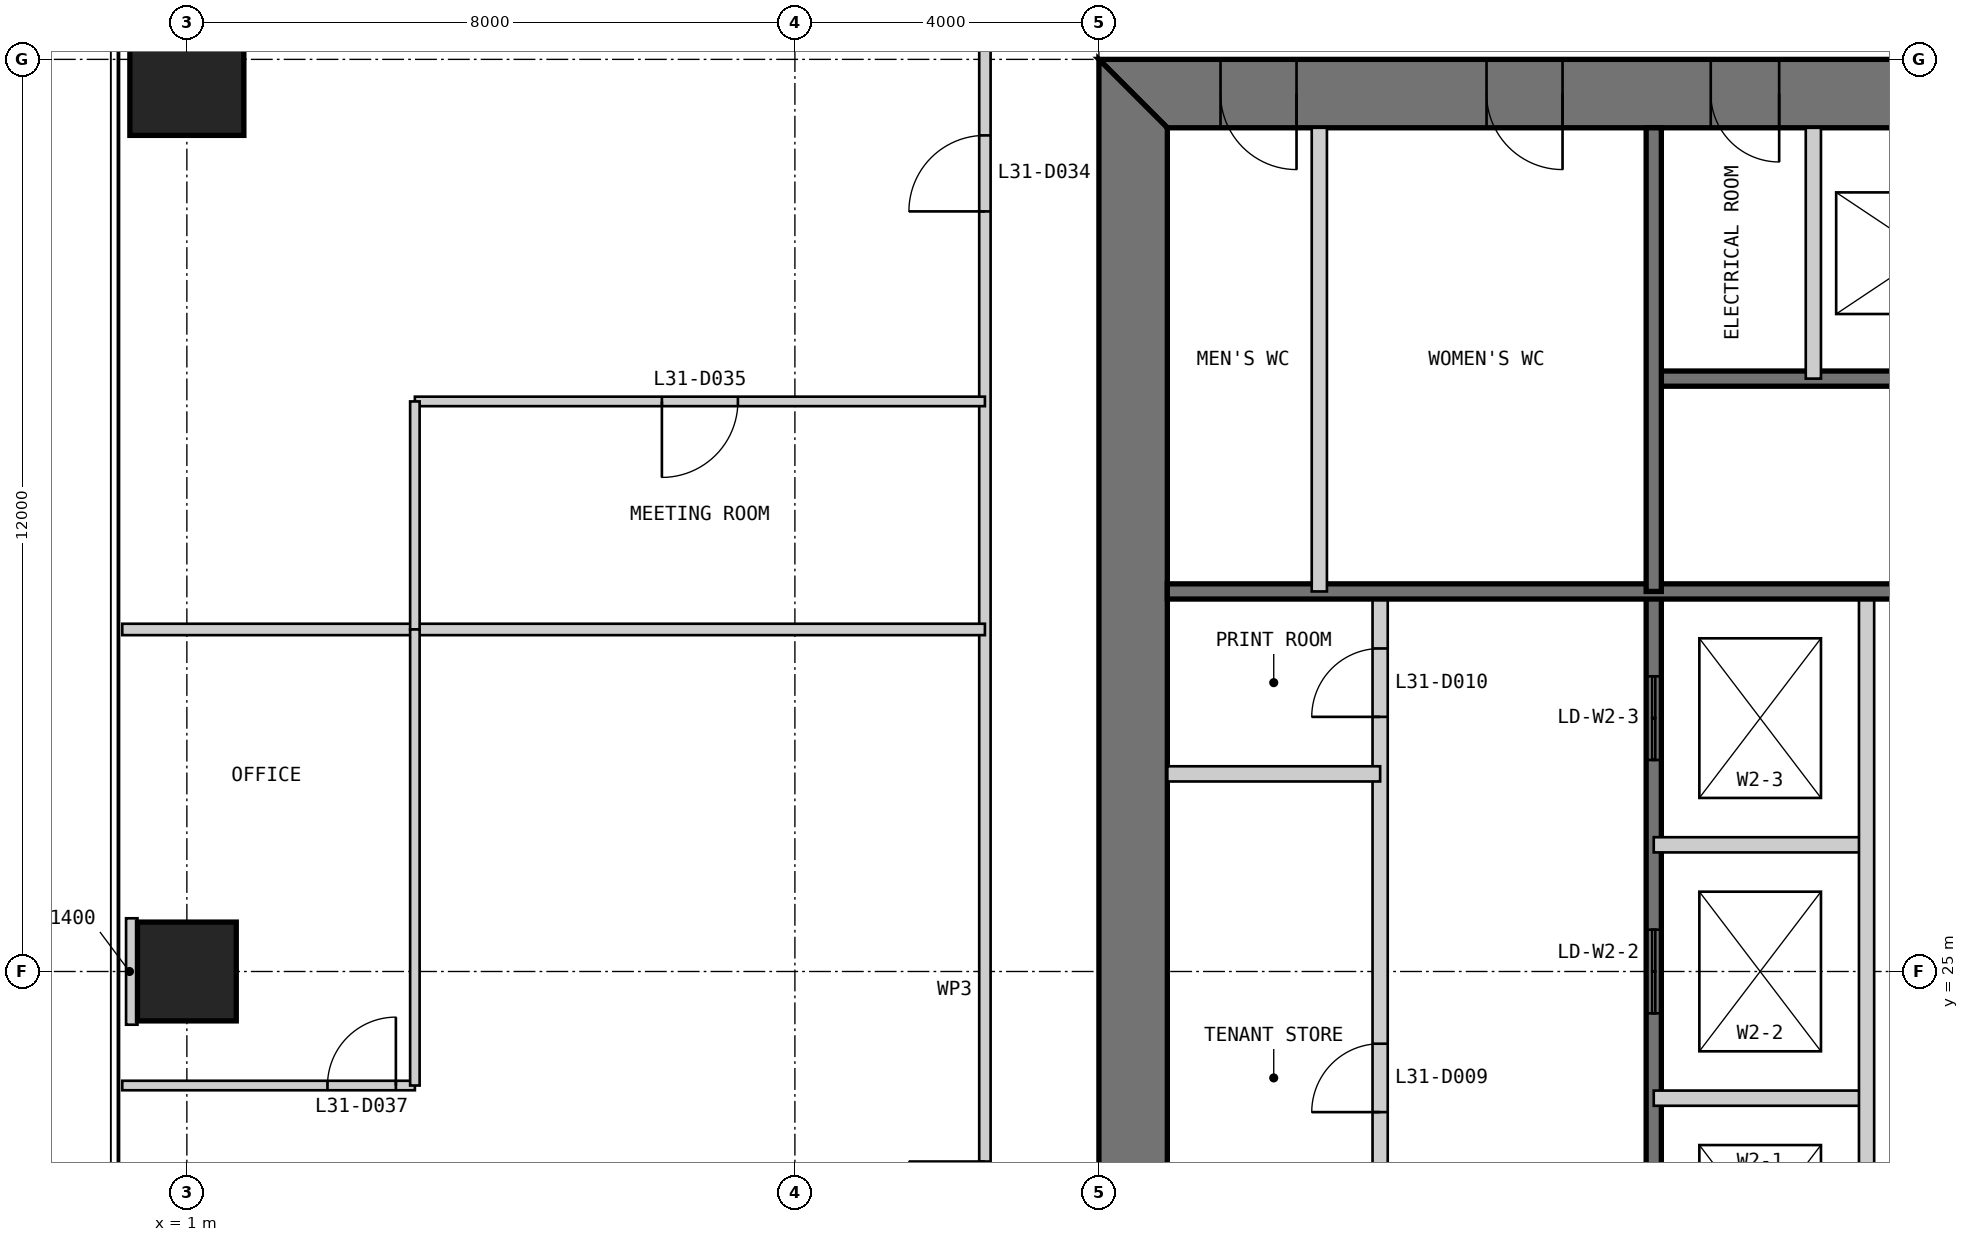
"""IFC4 building model, lengths in metres.
Left out: names, types, materials, properties, quantities, classifications, styles, units other than length and angle.
Written with IfcOpenShell. Run it as: python <this file> out.ifc"""

import sys

from ifc_helpers import new_model, si_unit, direction, frame, frame_2d, origin, origin_2d, place, context, subcontext, project, spatial, polyline, rectangle, outline, extrude, element, fill, save


model = new_model("IFC4")
c1 = context("Model", 3, precision=1e-05, world=origin(), true_north=direction((0.0, 1.0)))
c2 = subcontext(c1, "Body", "Model", "MODEL_VIEW")
j1 = project(units=[si_unit("LENGTHUNIT", "METRE"), si_unit("PLANEANGLEUNIT", "RADIAN")], contexts=[c1])
p1 = place(None, origin())
s1 = spatial("IfcSite", under=j1, at=p1, CompositionType="ELEMENT")
p2 = place(p1, origin())
s2 = spatial("IfcBuilding", under=s1, at=p2, CompositionType="ELEMENT")
p3 = place(p2, frame((0.0, 0.0, 134.4)))
s3 = spatial("IfcBuildingStorey", under=s2, at=p3, CompositionType="ELEMENT", Elevation=134.4)
p4 = place(p3, frame((1.0, 37.0, 0.0), z_axis=(0.0, 0.0, 1.0), x_axis=(1.0, 0.0, 0.0)))
e1 = element("IfcColumn", 1, at=p4, inside=s3, PredefinedType="COLUMN", context=c2, shape_type="SweptSolid", body=[
    extrude(rectangle(XDim=1.5, YDim=2.0, at=origin_2d()), origin(), (0.0, 0.0, 1.0), 4.0),
])
p5 = place(p3, frame((1.0, 25.0, 0.0), z_axis=(0.0, 0.0, 1.0), x_axis=(1.0, 0.0, 0.0)))
e2 = element("IfcColumn", 2, at=p5, inside=s3, PredefinedType="COLUMN", context=c2, shape_type="SweptSolid", body=[
    extrude(rectangle(XDim=1.3, YDim=1.3, at=origin_2d()), origin(), (0.0, 0.0, 1.0), 4.0),
])
p6 = place(p3, frame((37.0, 36.55, 0.0), z_axis=(0.0, 0.0, 1.0), x_axis=(-1.0, 0.0, 0.0)))
e3 = element("IfcWall", 3, at=p6, inside=s3, PredefinedType="SHEAR", context=c2, shape_type="SweptSolid", body=[
    extrude(outline(polyline([(0.0, -0.45), (24.0, -0.45), (23.1, 0.45), (0.9, 0.45), (0.0, -0.45)])), origin(), (0.0, 0.0, 1.0), 4.0),
])
p7 = place(p6, frame((4.9, 0.0, 0.0)))
e4 = element("IfcOpeningElement", 4, at=p7, cuts=e3, PredefinedType="OPENING", context=c2, shape_type="SweptSolid", body=[
    extrude(rectangle(XDim=1.0, YDim=2.2, at=frame_2d((0.5, 1.1))), frame((0.0, 0.46, 0.0), z_axis=(0.0, -1.0, 0.0), x_axis=(1.0, 0.0, 0.0)), (0.0, 0.0, 1.0), 0.92),
])
p8 = place(p6, frame((8.9, 0.0, 0.0)))
e5 = element("IfcOpeningElement", 5, at=p8, cuts=e3, PredefinedType="OPENING", context=c2, shape_type="SweptSolid", body=[
    extrude(rectangle(XDim=1.1, YDim=2.2, at=frame_2d((0.55, 1.1))), frame((0.0, 0.46, 0.0), z_axis=(0.0, -1.0, 0.0), x_axis=(1.0, 0.0, 0.0)), (0.0, 0.0, 1.0), 0.92),
])
p9 = place(p6, frame((15.05, 0.0, 0.0)))
e6 = element("IfcOpeningElement", 6, at=p9, cuts=e3, PredefinedType="OPENING", context=c2, shape_type="SweptSolid", body=[
    extrude(rectangle(XDim=0.9, YDim=2.2, at=frame_2d((0.45, 1.1))), frame((0.0, 0.46, 0.0), z_axis=(0.0, -1.0, 0.0), x_axis=(1.0, 0.0, 0.0)), (0.0, 0.0, 1.0), 0.92),
])
p10 = place(p6, frame((17.9, 0.0, 0.0)))
e7 = element("IfcOpeningElement", 7, at=p10, cuts=e3, PredefinedType="OPENING", context=c2, shape_type="SweptSolid", body=[
    extrude(rectangle(XDim=1.0, YDim=2.2, at=frame_2d((0.5, 1.1))), frame((0.0, 0.46, 0.0), z_axis=(0.0, -1.0, 0.0), x_axis=(1.0, 0.0, 0.0)), (0.0, 0.0, 1.0), 0.92),
])
p11 = place(p6, frame((21.4, 0.0, 0.0)))
e8 = element("IfcOpeningElement", 8, at=p11, cuts=e3, PredefinedType="OPENING", context=c2, shape_type="SweptSolid", body=[
    extrude(rectangle(XDim=1.0, YDim=2.2, at=frame_2d((0.5, 1.1))), frame((0.0, 0.46, 0.0), z_axis=(0.0, -1.0, 0.0), x_axis=(1.0, 0.0, 0.0)), (0.0, 0.0, 1.0), 0.92),
])
p12 = place(p3, frame((13.45, 36.1, 0.0), z_axis=(0.0, 0.0, 1.0), x_axis=(0.0, -1.0, 0.0)))
e9 = element("IfcWall", 9, at=p12, inside=s3, PredefinedType="SHEAR", context=c2, shape_type="SweptSolid", body=[
    extrude(outline(polyline([(-0.9, -0.45), (23.1, -0.45), (22.2, 0.45), (0.0, 0.45), (-0.9, -0.45)])), origin(), (0.0, 0.0, 1.0), 4.0),
])
p13 = place(p12, frame((20.2, 0.0, 0.0)))
e10 = element("IfcOpeningElement", 10, at=p13, cuts=e9, PredefinedType="OPENING", context=c2, shape_type="SweptSolid", body=[
    extrude(rectangle(XDim=1.0, YDim=2.2, at=frame_2d((0.5, 1.1))), frame((0.0, 0.46, 0.0), z_axis=(0.0, -1.0, 0.0), x_axis=(1.0, 0.0, 0.0)), (0.0, 0.0, 1.0), 0.92),
])
p14 = place(p12, frame((17.25, 0.0, 0.0)))
e11 = element("IfcOpeningElement", 11, at=p14, cuts=e9, PredefinedType="OPENING", context=c2, shape_type="SweptSolid", body=[
    extrude(rectangle(XDim=0.9, YDim=2.2, at=frame_2d((0.45, 1.1))), frame((0.0, 0.46, 0.0), z_axis=(0.0, -1.0, 0.0), x_axis=(1.0, 0.0, 0.0)), (0.0, 0.0, 1.0), 0.92),
])
p15 = place(p3, frame((16.7, 13.9, 0.0), z_axis=(0.0, 0.0, 1.0), x_axis=(0.0, 1.0, 0.0)))
e12 = element("IfcWall", 12, at=p15, inside=s3, PredefinedType="PARTITIONING", context=c2, shape_type="SweptSolid", body=[
    extrude(rectangle(XDim=16.1, YDim=0.2, at=frame_2d((8.05, 0.0))), origin(), (0.0, 0.0, 1.0), 3.8),
])
p16 = place(p15, frame((9.25, 0.0, 0.0)))
e13 = element("IfcOpeningElement", 13, at=p16, cuts=e12, PredefinedType="OPENING", context=c2, shape_type="SweptSolid", body=[
    extrude(rectangle(XDim=0.9, YDim=2.2, at=frame_2d((0.45, 1.1))), frame((0.0, 0.11, 0.0), z_axis=(0.0, -1.0, 0.0), x_axis=(1.0, 0.0, 0.0)), (0.0, 0.0, 1.0), 0.22),
])
p17 = place(p15, frame((14.45, 0.0, 0.0)))
e14 = element("IfcOpeningElement", 14, at=p17, cuts=e12, PredefinedType="OPENING", context=c2, shape_type="SweptSolid", body=[
    extrude(rectangle(XDim=0.9, YDim=2.2, at=frame_2d((0.45, 1.1))), frame((0.0, 0.11, 0.0), z_axis=(0.0, -1.0, 0.0), x_axis=(1.0, 0.0, 0.0)), (0.0, 0.0, 1.0), 0.22),
])
p18 = place(p3, frame((20.3, 13.9, 0.0), z_axis=(0.0, 0.0, 1.0), x_axis=(0.0, 1.0, 0.0)))
e15 = element("IfcWall", 15, at=p18, inside=s3, PredefinedType="SOLIDWALL", context=c2, shape_type="SweptSolid", body=[
    extrude(rectangle(XDim=16.1, YDim=0.2, at=frame_2d((8.05, 0.0))), origin(), (0.0, 0.0, 1.0), 3.8),
])
p19 = place(p18, frame((7.217, 0.0, 0.0)))
e16 = element("IfcOpeningElement", 16, at=p19, cuts=e15, PredefinedType="OPENING", context=c2, shape_type="SweptSolid", body=[
    extrude(rectangle(XDim=1.1, YDim=2.2, at=frame_2d((0.55, 1.1))), frame((0.0, 0.11, 0.0), z_axis=(0.0, -1.0, 0.0), x_axis=(1.0, 0.0, 0.0)), (0.0, 0.0, 1.0), 0.22),
])
p20 = place(p18, frame((10.55, 0.0, 0.0)))
e17 = element("IfcOpeningElement", 17, at=p20, cuts=e15, PredefinedType="OPENING", context=c2, shape_type="SweptSolid", body=[
    extrude(rectangle(XDim=1.1, YDim=2.2, at=frame_2d((0.55, 1.1))), frame((0.0, 0.11, 0.0), z_axis=(0.0, -1.0, 0.0), x_axis=(1.0, 0.0, 0.0)), (0.0, 0.0, 1.0), 0.22),
])
p21 = place(p18, frame((13.883, 0.0, 0.0)))
e18 = element("IfcOpeningElement", 18, at=p21, cuts=e15, PredefinedType="OPENING", context=c2, shape_type="SweptSolid", body=[
    extrude(rectangle(XDim=1.1, YDim=2.2, at=frame_2d((0.55, 1.1))), frame((0.0, 0.11, 0.0), z_axis=(0.0, -1.0, 0.0), x_axis=(1.0, 0.0, 0.0)), (0.0, 0.0, 1.0), 0.22),
])
for number, where, z_axis, x_axis in (
    (19, (20.3, 23.333, 0.0), (0.0, 0.0, 1.0), (1.0, 0.0, 0.0)),
    (20, (20.3, 26.667, 0.0), (0.0, 0.0, 1.0), (1.0, 0.0, 0.0)),
):
    element("IfcWall", number, at=place(p3, frame(where, z_axis=z_axis, x_axis=x_axis)), inside=s3, PredefinedType="PARTITIONING", context=c2, shape_type="SweptSolid", body=[
        extrude(rectangle(XDim=2.8, YDim=0.2, at=frame_2d((1.4, 0.0))), origin(), (0.0, 0.0, 1.0), 3.8),
    ])
p22 = place(p3, frame((23.1, 20.0, 0.0), z_axis=(0.0, 0.0, 1.0), x_axis=(0.0, 1.0, 0.0)))
e21 = element("IfcWall", 21, at=p22, inside=s3, PredefinedType="PARTITIONING", context=c2, shape_type="SweptSolid", body=[
    extrude(rectangle(XDim=10.0, YDim=0.2, at=frame_2d((5.0, 0.0))), origin(), (0.0, 0.0, 1.0), 3.8),
])
p23 = place(p3, frame((13.9, 27.6, 0.0), z_axis=(0.0, 0.0, 1.0), x_axis=(1.0, 0.0, 0.0)))
e22 = element("IfcWall", 22, at=p23, inside=s3, PredefinedType="PARTITIONING", context=c2, shape_type="SweptSolid", body=[
    extrude(rectangle(XDim=2.8, YDim=0.2, at=frame_2d((1.4, 0.0))), origin(), (0.0, 0.0, 1.0), 3.8),
])
p24 = place(p3, frame((29.7, 32.8, 0.0), z_axis=(0.0, 0.0, 1.0), x_axis=(-1.0, 0.0, 0.0)))
e23 = element("IfcWall", 23, at=p24, inside=s3, PredefinedType="SOLIDWALL", context=c2, shape_type="SweptSolid", body=[
    extrude(rectangle(XDim=9.4, YDim=0.2, at=frame_2d((4.7, 0.0))), origin(), (0.0, 0.0, 1.0), 3.8),
])
p25 = place(p24, frame((0.25, 0.0, 0.0)))
e24 = element("IfcOpeningElement", 24, at=p25, cuts=e23, PredefinedType="OPENING", context=c2, shape_type="SweptSolid", body=[
    extrude(rectangle(XDim=1.0, YDim=2.2, at=frame_2d((0.5, 1.1))), frame((0.0, 0.11, 0.0), z_axis=(0.0, -1.0, 0.0), x_axis=(1.0, 0.0, 0.0)), (0.0, 0.0, 1.0), 0.22),
])
p26 = place(p3, frame((29.7, 30.0, 0.0), z_axis=(0.0, 0.0, 1.0), x_axis=(-1.0, 0.0, 0.0)))
e25 = element("IfcWall", 25, at=p26, inside=s3, PredefinedType="SOLIDWALL", context=c2, shape_type="SweptSolid", body=[
    extrude(rectangle(XDim=15.8, YDim=0.2, at=frame_2d((7.9, 0.0))), origin(), (0.0, 0.0, 1.0), 3.8),
])
p27 = place(p3, frame((22.4, 36.1, 0.0), z_axis=(0.0, 0.0, 1.0), x_axis=(0.0, -1.0, 0.0)))
e26 = element("IfcWall", 26, at=p27, inside=s3, PredefinedType="PARTITIONING", context=c2, shape_type="SweptSolid", body=[
    extrude(rectangle(XDim=3.3, YDim=0.2, at=frame_2d((1.65, 0.0))), origin(), (0.0, 0.0, 1.0), 3.8),
])
p28 = place(p3, frame((20.3, 36.1, 0.0), z_axis=(0.0, 0.0, 1.0), x_axis=(0.0, -1.0, 0.0)))
e27 = element("IfcWall", 27, at=p28, inside=s3, PredefinedType="SOLIDWALL", context=c2, shape_type="SweptSolid", body=[
    extrude(rectangle(XDim=6.1, YDim=0.2, at=frame_2d((3.05, 0.0))), origin(), (0.0, 0.0, 1.0), 3.8),
])
p29 = place(p3, frame((15.9, 36.1, 0.0), z_axis=(0.0, 0.0, 1.0), x_axis=(0.0, -1.0, 0.0)))
e28 = element("IfcWall", 28, at=p29, inside=s3, PredefinedType="PARTITIONING", context=c2, shape_type="SweptSolid", body=[
    extrude(rectangle(XDim=6.1, YDim=0.2, at=frame_2d((3.05, 0.0))), origin(), (0.0, 0.0, 1.0), 3.8),
])
p30 = place(p3, frame((11.5, 38.5, 0.0), z_axis=(0.0, 0.0, 1.0), x_axis=(0.0, -1.0, 0.0)))
e29 = element("IfcWall", 29, at=p30, inside=s3, PredefinedType="PARTITIONING", context=c2, shape_type="SweptSolid", body=[
    extrude(rectangle(XDim=27.0, YDim=0.15, at=frame_2d((13.5, 0.0))), origin(), (0.0, 0.0, 1.0), 3.85),
])
p31 = place(p30, frame((2.5, 0.0, 0.0)))
e30 = element("IfcOpeningElement", 30, at=p31, cuts=e29, PredefinedType="OPENING", context=c2, shape_type="SweptSolid", body=[
    extrude(rectangle(XDim=1.0, YDim=2.2, at=frame_2d((0.5, 1.1))), frame((0.0, 0.085, 0.0), z_axis=(0.0, -1.0, 0.0), x_axis=(1.0, 0.0, 0.0)), (0.0, 0.0, 1.0), 0.17),
])
p32 = place(p30, frame((16.0, 0.0, 0.0)))
e31 = element("IfcOpeningElement", 31, at=p32, cuts=e29, PredefinedType="OPENING", context=c2, shape_type="SweptSolid", body=[
    extrude(rectangle(XDim=1.0, YDim=2.2, at=frame_2d((0.5, 1.1))), frame((0.0, 0.085, 0.0), z_axis=(0.0, -1.0, 0.0), x_axis=(1.0, 0.0, 0.0)), (0.0, 0.0, 1.0), 0.17),
])
p33 = place(p3, frame((4.0, 32.5, 0.0), z_axis=(0.0, 0.0, 1.0), x_axis=(1.0, 0.0, 0.0)))
e32 = element("IfcWall", 32, at=p33, inside=s3, PredefinedType="PARTITIONING", context=c2, shape_type="SweptSolid", body=[
    extrude(rectangle(XDim=7.5, YDim=0.125, at=frame_2d((3.75, 0.0))), origin(), (0.0, 0.0, 1.0), 3.85),
])
p34 = place(p33, frame((3.25, 0.0, 0.0)))
e33 = element("IfcOpeningElement", 33, at=p34, cuts=e32, PredefinedType="OPENING", context=c2, shape_type="SweptSolid", body=[
    extrude(rectangle(XDim=1.0, YDim=2.2, at=frame_2d((0.5, 1.1))), frame((0.0, 0.073, 0.0), z_axis=(0.0, -1.0, 0.0), x_axis=(1.0, 0.0, 0.0)), (0.0, 0.0, 1.0), 0.145),
])
p35 = place(p3, frame((0.15, 29.5, 0.0), z_axis=(0.0, 0.0, 1.0), x_axis=(1.0, 0.0, 0.0)))
e34 = element("IfcWall", 34, at=p35, inside=s3, PredefinedType="PARTITIONING", context=c2, shape_type="SweptSolid", body=[
    extrude(rectangle(XDim=11.35, YDim=0.15, at=frame_2d((5.675, 0.0))), origin(), (0.0, 0.0, 1.0), 3.85),
])
p36 = place(p3, frame((0.15, 23.5, 0.0), z_axis=(0.0, 0.0, 1.0), x_axis=(1.0, 0.0, 0.0)))
e35 = element("IfcWall", 35, at=p36, inside=s3, PredefinedType="PARTITIONING", context=c2, shape_type="SweptSolid", body=[
    extrude(rectangle(XDim=3.85, YDim=0.125, at=frame_2d((1.925, 0.0))), origin(), (0.0, 0.0, 1.0), 3.85),
])
p37 = place(p36, frame((2.7, 0.0, 0.0)))
e36 = element("IfcOpeningElement", 36, at=p37, cuts=e35, PredefinedType="OPENING", context=c2, shape_type="SweptSolid", body=[
    extrude(rectangle(XDim=0.9, YDim=2.2, at=frame_2d((0.45, 1.1))), frame((0.0, 0.073, 0.0), z_axis=(0.0, -1.0, 0.0), x_axis=(1.0, 0.0, 0.0)), (0.0, 0.0, 1.0), 0.145),
])
p38 = place(p3, frame((4.0, 32.5, 0.0), z_axis=(0.0, 0.0, 1.0), x_axis=(0.0, -1.0, 0.0)))
e37 = element("IfcWall", 37, at=p38, inside=s3, PredefinedType="PARTITIONING", context=c2, shape_type="SweptSolid", body=[
    extrude(rectangle(XDim=3.0, YDim=0.125, at=frame_2d((1.5, 0.0))), origin(), (0.0, 0.0, 1.0), 3.238),
])
p39 = place(p3, frame((4.0, 29.5, 0.0), z_axis=(0.0, 0.0, 1.0), x_axis=(0.0, -1.0, 0.0)))
e38 = element("IfcWall", 38, at=p39, inside=s3, PredefinedType="PARTITIONING", context=c2, shape_type="SweptSolid", body=[
    extrude(rectangle(XDim=6.0, YDim=0.125, at=frame_2d((3.0, 0.0))), origin(), (0.0, 0.0, 1.0), 3.238),
])
p40 = place(p3, frame((0.2, 25.0, 0.0), z_axis=(0.0, 0.0, 1.0), x_axis=(1.0, 0.0, 0.0)))
e39 = element("IfcWall", 39, at=p40, inside=s3, PredefinedType="PARTITIONING", context=c2, shape_type="SweptSolid", body=[
    extrude(rectangle(XDim=0.15, YDim=1.4, at=frame_2d((0.075, 0.0))), origin(), (0.0, 0.0, 1.0), 3.85),
])
p41 = place(p16, origin())
e40 = element("IfcDoor", 40, at=p41, inside=s3, OperationType="SINGLE_SWING_LEFT", PredefinedType="DOOR", context=c2, shape_type="SweptSolid", body=[
    extrude(rectangle(XDim=0.9, YDim=2.2, at=frame_2d((0.45, 1.1))), frame((0.0, 0.025, 0.0), z_axis=(0.0, -1.0, 0.0), x_axis=(1.0, 0.0, 0.0)), (0.0, 0.0, 1.0), 0.05),
])
fill(e13, e40)
p42 = place(p17, origin())
e41 = element("IfcDoor", 41, at=p42, inside=s3, OperationType="SINGLE_SWING_LEFT", PredefinedType="DOOR", context=c2, shape_type="SweptSolid", body=[
    extrude(rectangle(XDim=0.9, YDim=2.2, at=frame_2d((0.45, 1.1))), frame((0.0, 0.025, 0.0), z_axis=(0.0, -1.0, 0.0), x_axis=(1.0, 0.0, 0.0)), (0.0, 0.0, 1.0), 0.05),
])
fill(e14, e41)
p43 = place(p9, origin())
e42 = element("IfcDoor", 42, at=p43, inside=s3, OperationType="SINGLE_SWING_LEFT", PredefinedType="DOOR", context=c2, shape_type="SweptSolid", body=[
    extrude(rectangle(XDim=0.9, YDim=2.2, at=frame_2d((0.45, 1.1))), frame((0.0, 0.025, 0.0), z_axis=(0.0, -1.0, 0.0), x_axis=(1.0, 0.0, 0.0)), (0.0, 0.0, 1.0), 0.05),
    extrude(outline(polyline([(0.0, 0.0), (0.04, 0.0), (0.04, 2.16), (0.86, 2.16), (0.86, 0.0), (0.9, 0.0), (0.9, 2.2), (0.0, 2.2), (0.0, 0.0)])), frame((0.0, 0.3, 0.0), z_axis=(0.0, -1.0, 0.0), x_axis=(1.0, 0.0, 0.0)), (0.0, 0.0, 1.0), 0.6),
])
fill(e6, e42)
p44 = place(p10, origin())
e43 = element("IfcDoor", 43, at=p44, inside=s3, OperationType="SINGLE_SWING_LEFT", PredefinedType="DOOR", context=c2, shape_type="SweptSolid", body=[
    extrude(rectangle(XDim=1.0, YDim=2.2, at=frame_2d((0.5, 1.1))), frame((0.0, 0.025, 0.0), z_axis=(0.0, -1.0, 0.0), x_axis=(1.0, 0.0, 0.0)), (0.0, 0.0, 1.0), 0.05),
    extrude(outline(polyline([(0.0, 0.0), (0.04, 0.0), (0.04, 2.16), (0.96, 2.16), (0.96, 0.0), (1.0, 0.0), (1.0, 2.2), (0.0, 2.2), (0.0, 0.0)])), frame((0.0, 0.3, 0.0), z_axis=(0.0, -1.0, 0.0), x_axis=(1.0, 0.0, 0.0)), (0.0, 0.0, 1.0), 0.6),
])
fill(e7, e43)
p45 = place(p11, origin())
e44 = element("IfcDoor", 44, at=p45, inside=s3, OperationType="SINGLE_SWING_LEFT", PredefinedType="DOOR", context=c2, shape_type="SweptSolid", body=[
    extrude(rectangle(XDim=1.0, YDim=2.2, at=frame_2d((0.5, 1.1))), frame((0.0, 0.025, 0.0), z_axis=(0.0, -1.0, 0.0), x_axis=(1.0, 0.0, 0.0)), (0.0, 0.0, 1.0), 0.05),
    extrude(outline(polyline([(0.0, 0.0), (0.04, 0.0), (0.04, 2.16), (0.96, 2.16), (0.96, 0.0), (1.0, 0.0), (1.0, 2.2), (0.0, 2.2), (0.0, 0.0)])), frame((0.0, 0.3, 0.0), z_axis=(0.0, -1.0, 0.0), x_axis=(1.0, 0.0, 0.0)), (0.0, 0.0, 1.0), 0.6),
])
fill(e8, e44)
p46 = place(p31, frame((1.0, 0.0, 0.0), z_axis=(0.0, 0.0, 1.0), x_axis=(-1.0, 0.0, 0.0)))
e45 = element("IfcDoor", 45, at=p46, inside=s3, OperationType="SINGLE_SWING_LEFT", PredefinedType="DOOR", context=c2, shape_type="SweptSolid", body=[
    extrude(rectangle(XDim=1.0, YDim=2.2, at=frame_2d((0.5, 1.1))), frame((0.0, 0.025, 0.0), z_axis=(0.0, -1.0, 0.0), x_axis=(1.0, 0.0, 0.0)), (0.0, 0.0, 1.0), 0.05),
])
fill(e30, e45)
p47 = place(p34, frame((1.0, 0.0, 0.0), z_axis=(0.0, 0.0, 1.0), x_axis=(-1.0, 0.0, 0.0)))
e46 = element("IfcDoor", 46, at=p47, inside=s3, OperationType="SINGLE_SWING_RIGHT", PredefinedType="DOOR", context=c2, shape_type="SweptSolid", body=[
    extrude(rectangle(XDim=1.0, YDim=2.2, at=frame_2d((0.5, 1.1))), frame((0.0, 0.025, 0.0), z_axis=(0.0, -1.0, 0.0), x_axis=(1.0, 0.0, 0.0)), (0.0, 0.0, 1.0), 0.05),
])
fill(e33, e46)
p48 = place(p37, origin())
e47 = element("IfcDoor", 47, at=p48, inside=s3, OperationType="SINGLE_SWING_RIGHT", PredefinedType="DOOR", context=c2, shape_type="SweptSolid", body=[
    extrude(rectangle(XDim=0.9, YDim=2.2, at=frame_2d((0.45, 1.1))), frame((0.0, 0.025, 0.0), z_axis=(0.0, -1.0, 0.0), x_axis=(1.0, 0.0, 0.0)), (0.0, 0.0, 1.0), 0.05),
])
fill(e36, e47)
p49 = place(p20, origin())
e48 = element("IfcDoor", 48, at=p49, inside=s3, OperationType="DOUBLE_DOOR_SLIDING", PredefinedType="DOOR", context=c2, shape_type="SweptSolid", body=[
    extrude(rectangle(XDim=1.1, YDim=2.2, at=frame_2d((0.55, 1.1))), frame((0.0, 0.025, 0.0), z_axis=(0.0, -1.0, 0.0), x_axis=(1.0, 0.0, 0.0)), (0.0, 0.0, 1.0), 0.05),
])
fill(e17, e48)
p50 = place(p21, origin())
e49 = element("IfcDoor", 49, at=p50, inside=s3, OperationType="DOUBLE_DOOR_SLIDING", PredefinedType="DOOR", context=c2, shape_type="SweptSolid", body=[
    extrude(rectangle(XDim=1.1, YDim=2.2, at=frame_2d((0.55, 1.1))), frame((0.0, 0.025, 0.0), z_axis=(0.0, -1.0, 0.0), x_axis=(1.0, 0.0, 0.0)), (0.0, 0.0, 1.0), 0.05),
])
fill(e18, e49)
save(model, sys.argv[1])
